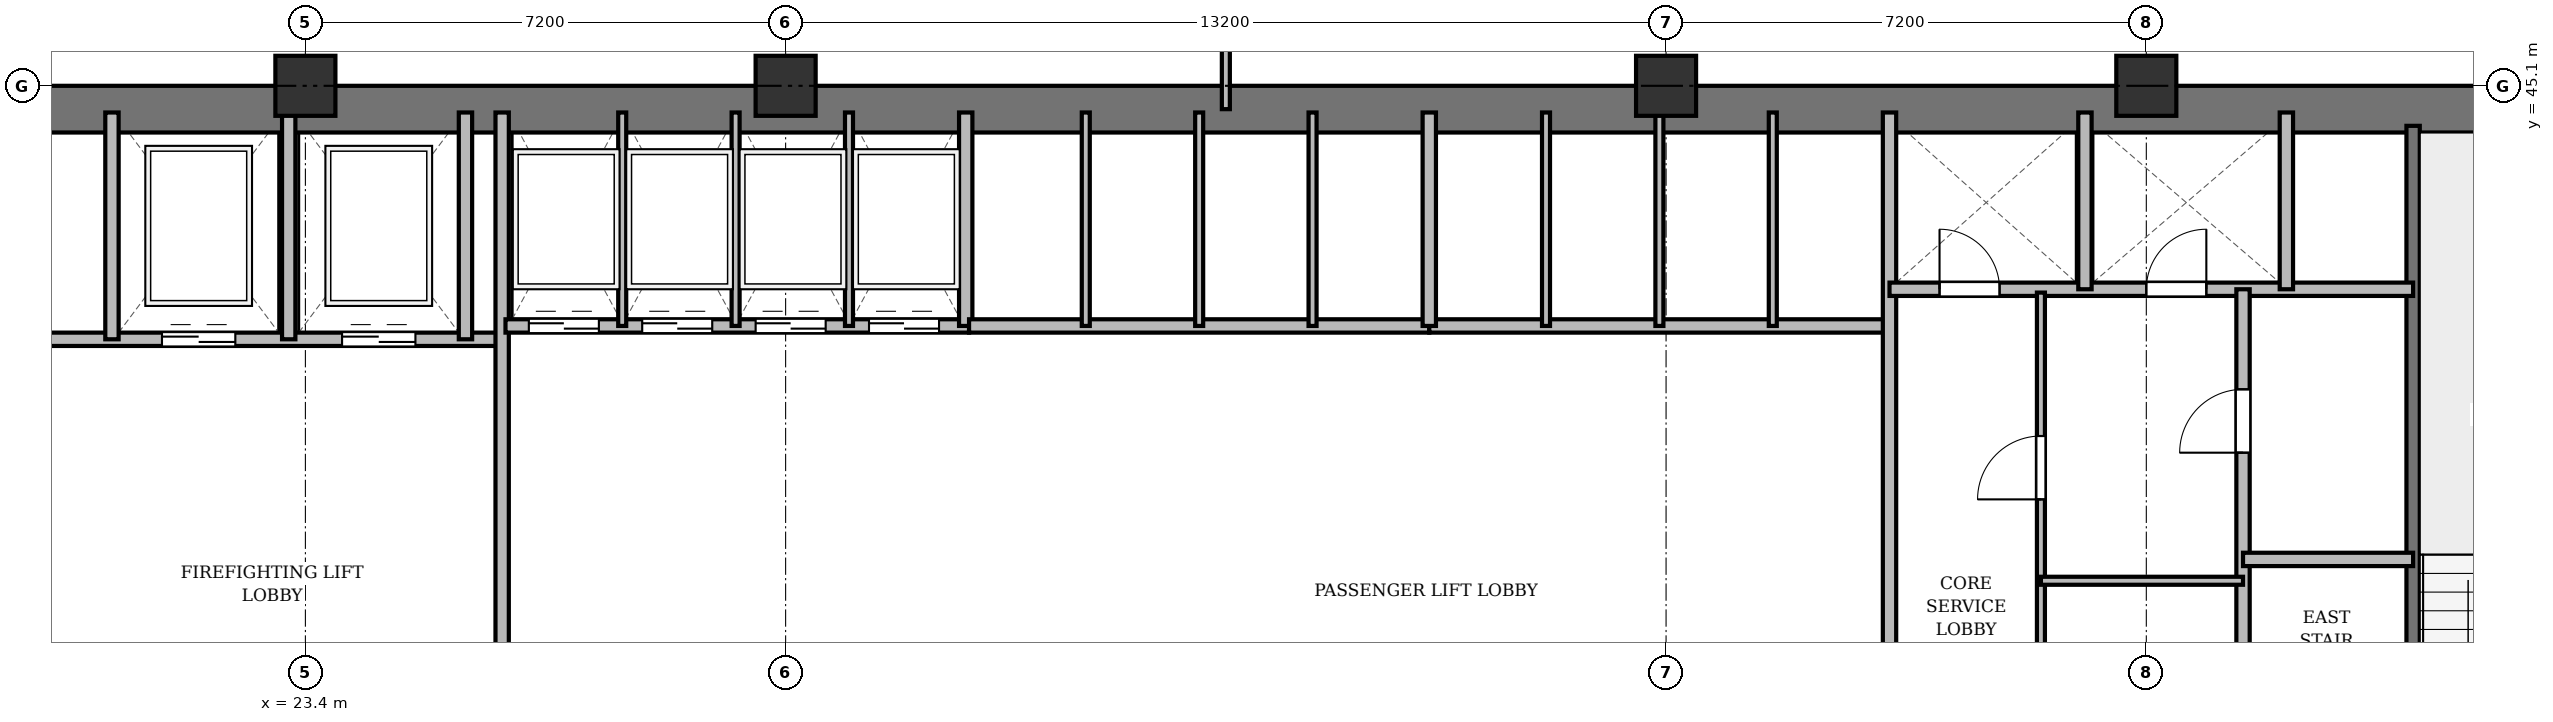
"""IFC4 building model, lengths in metres.
Left out: names, types, materials, properties, quantities, classifications, styles, units other than length and angle.
Written with IfcOpenShell. Run it as: python <this file> out.ifc"""

import sys

from ifc_helpers import new_model, si_unit, direction, frame, frame_2d, origin, origin_2d, place, context, subcontext, project, spatial, rectangle, extrude, source, transform, mapped, element, fill, save


model = new_model("IFC4")
c1 = context("Model", 3, precision=1e-05, world=origin(), true_north=direction((0.0, 1.0)))
c2 = subcontext(c1, "Body", "Model", "MODEL_VIEW")
j1 = project(units=[si_unit("LENGTHUNIT", "METRE"), si_unit("PLANEANGLEUNIT", "RADIAN")], contexts=[c1])
p1 = place(None, origin())
s1 = spatial("IfcSite", under=j1, at=p1, CompositionType="ELEMENT")
p2 = place(p1, origin())
s2 = spatial("IfcBuilding", under=s1, at=p2, CompositionType="ELEMENT")
p3 = place(p2, frame((0.0, 0.0, 37.9)))
s3 = spatial("IfcBuildingStorey", under=s2, at=p3, CompositionType="ELEMENT", Elevation=37.9)
m1 = source(origin(), c2, "Body", "SweptSolid", [
    extrude(rectangle(XDim=0.9, YDim=0.9, at=origin_2d()), origin(), (0.0, 0.0, 1.0), 3.6),
])
for number, where, z_axis, x_axis in (
    (1, (23.4, 45.1, 0.0), (0.0, 0.0, 1.0), (1.0, 0.0, 0.0)),
    (2, (30.6, 45.1, 0.0), (0.0, 0.0, 1.0), (1.0, 0.0, 0.0)),
    (3, (43.8, 45.1, 0.0), (0.0, 0.0, 1.0), (1.0, 0.0, 0.0)),
    (4, (51.0, 45.1, 0.0), (0.0, 0.0, 1.0), (1.0, 0.0, 0.0)),
):
    element("IfcColumn", number, at=place(p3, frame(where, z_axis=z_axis, x_axis=x_axis)), inside=s3, PredefinedType="COLUMN", context=c2, shape_type="MappedRepresentation", body=[
        mapped(m1, transform((0.0, 0.0, 0.0), x_axis=(1.0, 0.0, 0.0), y_axis=(0.0, 1.0, 0.0), z_axis=(0.0, 0.0, 1.0), scale=1.0)),
    ])
p4 = place(p3, frame((15.5, 44.75, 0.0), z_axis=(0.0, 0.0, 1.0), x_axis=(1.0, 0.0, 0.0)))
e5 = element("IfcWall", 5, at=p4, inside=s3, PredefinedType="SHEAR", context=c2, shape_type="SweptSolid", body=[
    extrude(rectangle(XDim=43.4, YDim=0.7, at=frame_2d((21.7, 0.0))), origin(), (0.0, 0.0, 1.0), 3.34),
])
p5 = place(p3, frame((55.0, 33.4, 0.0), z_axis=(0.0, 0.0, 1.0), x_axis=(0.0, 1.0, 0.0)))
e6 = element("IfcWall", 6, at=p5, inside=s3, PredefinedType="SHEAR", context=c2, shape_type="SweptSolid", body=[
    extrude(rectangle(XDim=11.1, YDim=0.2, at=frame_2d((5.55, 0.0))), origin(), (0.0, 0.0, 1.0), 3.34),
])
p6 = place(p5, frame((0.85, 0.0, 0.0)))
e7 = element("IfcOpeningElement", 7, at=p6, cuts=e6, PredefinedType="OPENING", context=c2, shape_type="SweptSolid", body=[
    extrude(rectangle(XDim=1.1, YDim=2.15, at=frame_2d((0.55, 1.075))), frame((0.0, 0.11, 0.0), z_axis=(0.0, -1.0, 0.0), x_axis=(1.0, 0.0, 0.0)), (0.0, 0.0, 1.0), 0.22),
])
p7 = place(p3, frame((19.55, 41.3, 0.0), z_axis=(0.0, 0.0, 1.0), x_axis=(1.0, 0.0, 0.0)))
e8 = element("IfcWall", 8, at=p7, inside=s3, PredefinedType="SOLIDWALL", context=c2, shape_type="SweptSolid", body=[
    extrude(rectangle(XDim=6.75, YDim=0.2, at=frame_2d((3.375, 0.0))), origin(), (0.0, 0.0, 1.0), 3.34),
])
p8 = place(p7, frame((1.7, 0.0, 0.0)))
e9 = element("IfcOpeningElement", 9, at=p8, cuts=e8, PredefinedType="OPENING", context=c2, shape_type="SweptSolid", body=[
    extrude(rectangle(XDim=1.1, YDim=2.15, at=frame_2d((0.55, 1.075))), frame((0.0, 0.11, 0.0), z_axis=(0.0, -1.0, 0.0), x_axis=(1.0, 0.0, 0.0)), (0.0, 0.0, 1.0), 0.22),
])
p9 = place(p7, frame((4.4, 0.0, 0.0)))
e10 = element("IfcOpeningElement", 10, at=p9, cuts=e8, PredefinedType="OPENING", context=c2, shape_type="SweptSolid", body=[
    extrude(rectangle(XDim=1.1, YDim=2.15, at=frame_2d((0.55, 1.075))), frame((0.0, 0.11, 0.0), z_axis=(0.0, -1.0, 0.0), x_axis=(1.0, 0.0, 0.0)), (0.0, 0.0, 1.0), 0.22),
])
for number, where, z_axis, x_axis in (
    (11, (20.5, 41.3, 0.0), (0.0, 0.0, 1.0), (0.0, 1.0, 0.0)),
    (12, (23.15, 41.3, 0.0), (0.0, 0.0, 1.0), (0.0, 1.0, 0.0)),
    (13, (25.8, 41.3, 0.0), (0.0, 0.0, 1.0), (0.0, 1.0, 0.0)),
):
    element("IfcWall", number, at=place(p3, frame(where, z_axis=z_axis, x_axis=x_axis)), inside=s3, PredefinedType="SOLIDWALL", context=c2, shape_type="SweptSolid", body=[
        extrude(rectangle(XDim=3.4, YDim=0.2, at=frame_2d((1.7, 0.0))), origin(), (0.0, 0.0, 1.0), 3.34),
    ])
p10 = place(p3, frame((26.35, 33.4, 0.0), z_axis=(0.0, 0.0, 1.0), x_axis=(0.0, 1.0, 0.0)))
e14 = element("IfcWall", 14, at=p10, inside=s3, PredefinedType="SOLIDWALL", context=c2, shape_type="SweptSolid", body=[
    extrude(rectangle(XDim=11.3, YDim=0.2, at=frame_2d((5.65, 0.0))), origin(), (0.0, 0.0, 1.0), 2.69),
])
p11 = place(p3, frame((26.4, 41.5, 0.0), z_axis=(0.0, 0.0, 1.0), x_axis=(1.0, 0.0, 0.0)))
e15 = element("IfcWall", 15, at=p11, inside=s3, PredefinedType="SOLIDWALL", context=c2, shape_type="SweptSolid", body=[
    extrude(rectangle(XDim=6.95, YDim=0.2, at=frame_2d((3.475, 0.0))), origin(), (0.0, 0.0, 1.0), 3.34),
])
p12 = place(p11, frame((0.35, 0.0, 0.0)))
e16 = element("IfcOpeningElement", 16, at=p12, cuts=e15, PredefinedType="OPENING", context=c2, shape_type="SweptSolid", body=[
    extrude(rectangle(XDim=1.05, YDim=2.15, at=frame_2d((0.525, 1.075))), frame((0.0, 0.11, 0.0), z_axis=(0.0, -1.0, 0.0), x_axis=(1.0, 0.0, 0.0)), (0.0, 0.0, 1.0), 0.22),
])
p13 = place(p11, frame((2.05, 0.0, 0.0)))
e17 = element("IfcOpeningElement", 17, at=p13, cuts=e15, PredefinedType="OPENING", context=c2, shape_type="SweptSolid", body=[
    extrude(rectangle(XDim=1.05, YDim=2.15, at=frame_2d((0.525, 1.075))), frame((0.0, 0.11, 0.0), z_axis=(0.0, -1.0, 0.0), x_axis=(1.0, 0.0, 0.0)), (0.0, 0.0, 1.0), 0.22),
])
p14 = place(p11, frame((3.75, 0.0, 0.0)))
e18 = element("IfcOpeningElement", 18, at=p14, cuts=e15, PredefinedType="OPENING", context=c2, shape_type="SweptSolid", body=[
    extrude(rectangle(XDim=1.05, YDim=2.15, at=frame_2d((0.525, 1.075))), frame((0.0, 0.11, 0.0), z_axis=(0.0, -1.0, 0.0), x_axis=(1.0, 0.0, 0.0)), (0.0, 0.0, 1.0), 0.22),
])
p15 = place(p11, frame((5.45, 0.0, 0.0)))
e19 = element("IfcOpeningElement", 19, at=p15, cuts=e15, PredefinedType="OPENING", context=c2, shape_type="SweptSolid", body=[
    extrude(rectangle(XDim=1.05, YDim=2.15, at=frame_2d((0.525, 1.075))), frame((0.0, 0.11, 0.0), z_axis=(0.0, -1.0, 0.0), x_axis=(1.0, 0.0, 0.0)), (0.0, 0.0, 1.0), 0.22),
])
p16 = place(p3, frame((33.3, 41.5, 0.0), z_axis=(0.0, 0.0, 1.0), x_axis=(0.0, 1.0, 0.0)))
e20 = element("IfcWall", 20, at=p16, inside=s3, PredefinedType="SOLIDWALL", context=c2, shape_type="SweptSolid", body=[
    extrude(rectangle(XDim=3.2, YDim=0.2, at=frame_2d((1.6, 0.0))), origin(), (0.0, 0.0, 1.0), 3.34),
])
for number, where, z_axis, x_axis in (
    (21, (28.15, 41.5, 0.0), (0.0, 0.0, 1.0), (0.0, 1.0, 0.0)),
    (22, (29.85, 41.5, 0.0), (0.0, 0.0, 1.0), (0.0, 1.0, 0.0)),
    (23, (31.55, 41.5, 0.0), (0.0, 0.0, 1.0), (0.0, 1.0, 0.0)),
):
    element("IfcWall", number, at=place(p3, frame(where, z_axis=z_axis, x_axis=x_axis)), inside=s3, PredefinedType="PARTITIONING", context=c2, shape_type="SweptSolid", body=[
        extrude(rectangle(XDim=3.2, YDim=0.12, at=frame_2d((1.6, 0.0))), origin(), (0.0, 0.0, 1.0), 3.34),
    ])
p17 = place(p3, frame((33.35, 41.5, 0.0), z_axis=(0.0, 0.0, 1.0), x_axis=(1.0, 0.0, 0.0)))
e24 = element("IfcWall", 24, at=p17, inside=s3, PredefinedType="SOLIDWALL", context=c2, shape_type="SweptSolid", body=[
    extrude(rectangle(XDim=6.9, YDim=0.2, at=frame_2d((3.45, 0.0))), origin(), (0.0, 0.0, 1.0), 3.34),
])
for number, where, z_axis, x_axis in (
    (25, (35.1, 41.5, 0.0), (0.0, 0.0, 1.0), (0.0, 1.0, 0.0)),
    (26, (36.8, 41.5, 0.0), (0.0, 0.0, 1.0), (0.0, 1.0, 0.0)),
    (27, (38.5, 41.5, 0.0), (0.0, 0.0, 1.0), (0.0, 1.0, 0.0)),
):
    element("IfcWall", number, at=place(p3, frame(where, z_axis=z_axis, x_axis=x_axis)), inside=s3, PredefinedType="PARTITIONING", context=c2, shape_type="SweptSolid", body=[
        extrude(rectangle(XDim=3.2, YDim=0.12, at=frame_2d((1.6, 0.0))), origin(), (0.0, 0.0, 1.0), 3.34),
    ])
p18 = place(p3, frame((40.25, 41.5, 0.0), z_axis=(0.0, 0.0, 1.0), x_axis=(1.0, 0.0, 0.0)))
e28 = element("IfcWall", 28, at=p18, inside=s3, PredefinedType="SOLIDWALL", context=c2, shape_type="SweptSolid", body=[
    extrude(rectangle(XDim=6.9, YDim=0.2, at=frame_2d((3.45, 0.0))), origin(), (0.0, 0.0, 1.0), 2.752),
])
p19 = place(p3, frame((40.25, 41.5, 0.0), z_axis=(0.0, 0.0, 1.0), x_axis=(0.0, 1.0, 0.0)))
e29 = element("IfcWall", 29, at=p19, inside=s3, PredefinedType="SOLIDWALL", context=c2, shape_type="SweptSolid", body=[
    extrude(rectangle(XDim=3.2, YDim=0.2, at=frame_2d((1.6, 0.0))), origin(), (0.0, 0.0, 1.0), 3.34),
])
p20 = place(p3, frame((42.0, 41.5, 0.0), z_axis=(0.0, 0.0, 1.0), x_axis=(0.0, 1.0, 0.0)))
e30 = element("IfcWall", 30, at=p20, inside=s3, PredefinedType="PARTITIONING", context=c2, shape_type="SweptSolid", body=[
    extrude(rectangle(XDim=3.2, YDim=0.12, at=frame_2d((1.6, 0.0))), origin(), (0.0, 0.0, 1.0), 3.34),
])
p21 = place(p3, frame((43.7, 41.5, 0.0), z_axis=(0.0, 0.0, 1.0), x_axis=(0.0, 1.0, 0.0)))
e31 = element("IfcWall", 31, at=p21, inside=s3, PredefinedType="PARTITIONING", context=c2, shape_type="SweptSolid", body=[
    extrude(rectangle(XDim=3.2, YDim=0.12, at=frame_2d((1.6, 0.0))), origin(), (0.0, 0.0, 1.0), 2.752),
])
p22 = place(p3, frame((45.4, 41.5, 0.0), z_axis=(0.0, 0.0, 1.0), x_axis=(0.0, 1.0, 0.0)))
e32 = element("IfcWall", 32, at=p22, inside=s3, PredefinedType="PARTITIONING", context=c2, shape_type="SweptSolid", body=[
    extrude(rectangle(XDim=3.2, YDim=0.12, at=frame_2d((1.6, 0.0))), origin(), (0.0, 0.0, 1.0), 3.34),
])
p23 = place(p3, frame((47.15, 33.4, 0.0), z_axis=(0.0, 0.0, 1.0), x_axis=(0.0, 1.0, 0.0)))
e33 = element("IfcWall", 33, at=p23, inside=s3, PredefinedType="SOLIDWALL", context=c2, shape_type="SweptSolid", body=[
    extrude(rectangle(XDim=11.3, YDim=0.2, at=frame_2d((5.65, 0.0))), origin(), (0.0, 0.0, 1.0), 2.69),
])
p24 = place(p3, frame((47.15, 42.05, 0.0), z_axis=(0.0, 0.0, 1.0), x_axis=(1.0, 0.0, 0.0)))
e34 = element("IfcWall", 34, at=p24, inside=s3, PredefinedType="SOLIDWALL", context=c2, shape_type="SweptSolid", body=[
    extrude(rectangle(XDim=7.85, YDim=0.2, at=frame_2d((3.925, 0.0))), origin(), (0.0, 0.0, 1.0), 2.752),
])
p25 = place(p24, frame((0.75, 0.0, 0.0)))
e35 = element("IfcOpeningElement", 35, at=p25, cuts=e34, PredefinedType="OPENING", context=c2, shape_type="SweptSolid", body=[
    extrude(rectangle(XDim=0.9, YDim=2.1, at=frame_2d((0.45, 1.05))), frame((0.0, 0.11, 0.0), z_axis=(0.0, -1.0, 0.0), x_axis=(1.0, 0.0, 0.0)), (0.0, 0.0, 1.0), 0.22),
])
p26 = place(p24, frame((3.85, 0.0, 0.0)))
e36 = element("IfcOpeningElement", 36, at=p26, cuts=e34, PredefinedType="OPENING", context=c2, shape_type="SweptSolid", body=[
    extrude(rectangle(XDim=0.9, YDim=2.1, at=frame_2d((0.45, 1.05))), frame((0.0, 0.11, 0.0), z_axis=(0.0, -1.0, 0.0), x_axis=(1.0, 0.0, 0.0)), (0.0, 0.0, 1.0), 0.22),
])
for number, where, z_axis, x_axis in (
    (37, (50.08, 42.05, 0.0), (0.0, 0.0, 1.0), (0.0, 1.0, 0.0)),
    (38, (53.1, 42.05, 0.0), (0.0, 0.0, 1.0), (0.0, 1.0, 0.0)),
):
    element("IfcWall", number, at=place(p3, frame(where, z_axis=z_axis, x_axis=x_axis)), inside=s3, PredefinedType="SOLIDWALL", context=c2, shape_type="SweptSolid", body=[
        extrude(rectangle(XDim=2.65, YDim=0.2, at=frame_2d((1.325, 0.0))), origin(), (0.0, 0.0, 1.0), 3.34),
    ])
p27 = place(p3, frame((52.45, 33.4, 0.0), z_axis=(0.0, 0.0, 1.0), x_axis=(0.0, 1.0, 0.0)))
e39 = element("IfcWall", 39, at=p27, inside=s3, PredefinedType="PARTITIONING", context=c2, shape_type="SweptSolid", body=[
    extrude(rectangle(XDim=8.65, YDim=0.2, at=frame_2d((4.325, 0.0))), origin(), (0.0, 0.0, 1.0), 2.69),
])
p28 = place(p27, frame((6.2, 0.0, 0.0)))
e40 = element("IfcOpeningElement", 40, at=p28, cuts=e39, PredefinedType="OPENING", context=c2, shape_type="SweptSolid", body=[
    extrude(rectangle(XDim=0.95, YDim=2.15, at=frame_2d((0.475, 1.075))), frame((0.0, 0.11, 0.0), z_axis=(0.0, -1.0, 0.0), x_axis=(1.0, 0.0, 0.0)), (0.0, 0.0, 1.0), 0.22),
])
p29 = place(p3, frame((52.45, 38.0, 0.0), z_axis=(0.0, 0.0, 1.0), x_axis=(1.0, 0.0, 0.0)))
e41 = element("IfcWall", 41, at=p29, inside=s3, PredefinedType="PARTITIONING", context=c2, shape_type="SweptSolid", body=[
    extrude(rectangle(XDim=2.55, YDim=0.2, at=frame_2d((1.275, 0.0))), origin(), (0.0, 0.0, 1.0), 3.34),
])
p30 = place(p3, frame((49.42, 33.4, 0.0), z_axis=(0.0, 0.0, 1.0), x_axis=(0.0, 1.0, 0.0)))
e42 = element("IfcWall", 42, at=p30, inside=s3, PredefinedType="PARTITIONING", context=c2, shape_type="SweptSolid", body=[
    extrude(rectangle(XDim=8.6, YDim=0.12, at=frame_2d((4.3, 0.0))), origin(), (0.0, 0.0, 1.0), 2.69),
])
p31 = place(p30, frame((1.3, 0.0, 0.0)))
e43 = element("IfcOpeningElement", 43, at=p31, cuts=e42, PredefinedType="OPENING", context=c2, shape_type="SweptSolid", body=[
    extrude(rectangle(XDim=0.95, YDim=2.15, at=frame_2d((0.475, 1.075))), frame((0.0, 0.07, 0.0), z_axis=(0.0, -1.0, 0.0), x_axis=(1.0, 0.0, 0.0)), (0.0, 0.0, 1.0), 0.14),
])
p32 = place(p30, frame((5.5, 0.0, 0.0)))
e44 = element("IfcOpeningElement", 44, at=p32, cuts=e42, PredefinedType="OPENING", context=c2, shape_type="SweptSolid", body=[
    extrude(rectangle(XDim=0.95, YDim=2.15, at=frame_2d((0.475, 1.075))), frame((0.0, 0.07, 0.0), z_axis=(0.0, -1.0, 0.0), x_axis=(1.0, 0.0, 0.0)), (0.0, 0.0, 1.0), 0.14),
])
p33 = place(p3, frame((49.42, 37.68, 0.0), z_axis=(0.0, 0.0, 1.0), x_axis=(1.0, 0.0, 0.0)))
e45 = element("IfcWall", 45, at=p33, inside=s3, PredefinedType="PARTITIONING", context=c2, shape_type="SweptSolid", body=[
    extrude(rectangle(XDim=3.03, YDim=0.12, at=frame_2d((1.515, 0.0))), origin(), (0.0, 0.0, 1.0), 2.752),
])
p34 = place(p3, frame((37.2, 44.75, 0.0), z_axis=(0.0, 0.0, 1.0), x_axis=(0.0, 1.0, 0.0)))
e46 = element("IfcWall", 46, at=p34, inside=s3, PredefinedType="PARTITIONING", context=c2, shape_type="SweptSolid", body=[
    extrude(rectangle(XDim=3.61, YDim=0.12, at=frame_2d((1.805, 0.0))), origin(), (0.0, 0.0, 1.0), 2.69),
])
p35 = place(p34, frame((1.1, 0.0, 0.0)))
e47 = element("IfcOpeningElement", 47, at=p35, cuts=e46, PredefinedType="OPENING", context=c2, shape_type="SweptSolid", body=[
    extrude(rectangle(XDim=0.95, YDim=2.15, at=frame_2d((0.475, 1.075))), frame((0.0, 0.07, 0.0), z_axis=(0.0, -1.0, 0.0), x_axis=(1.0, 0.0, 0.0)), (0.0, 0.0, 1.0), 0.14),
])
m2 = source(origin(), c2, "Body", "SweptSolid", [
    extrude(rectangle(XDim=1.1, YDim=2.15, at=frame_2d((0.55, 1.075))), frame((0.0, 0.025, 0.0), z_axis=(0.0, -1.0, 0.0), x_axis=(1.0, 0.0, 0.0)), (0.0, 0.0, 1.0), 0.05),
])
p36 = place(p8, origin())
e48 = element("IfcDoor", 48, at=p36, inside=s3, OperationType="DOUBLE_DOOR_SLIDING", PredefinedType="DOOR", context=c2, shape_type="MappedRepresentation", body=[
    mapped(m2, transform((0.0, 0.0, 0.0), x_axis=(1.0, 0.0, 0.0), y_axis=(0.0, 1.0, 0.0), z_axis=(0.0, 0.0, 1.0), scale=1.0)),
])
fill(e9, e48)
p37 = place(p9, origin())
e49 = element("IfcDoor", 49, at=p37, inside=s3, OperationType="DOUBLE_DOOR_SLIDING", PredefinedType="DOOR", context=c2, shape_type="MappedRepresentation", body=[
    mapped(m2, transform((0.0, 0.0, 0.0), x_axis=(1.0, 0.0, 0.0), y_axis=(0.0, 1.0, 0.0), z_axis=(0.0, 0.0, 1.0), scale=1.0)),
])
fill(e10, e49)
m3 = source(origin(), c2, "Body", "SweptSolid", [
    extrude(rectangle(XDim=1.05, YDim=2.15, at=frame_2d((0.525, 1.075))), frame((0.0, 0.025, 0.0), z_axis=(0.0, -1.0, 0.0), x_axis=(1.0, 0.0, 0.0)), (0.0, 0.0, 1.0), 0.05),
])
p38 = place(p12, origin())
e50 = element("IfcDoor", 50, at=p38, inside=s3, OperationType="DOUBLE_DOOR_SLIDING", PredefinedType="DOOR", context=c2, shape_type="MappedRepresentation", body=[
    mapped(m3, transform((0.0, 0.0, 0.0), x_axis=(1.0, 0.0, 0.0), y_axis=(0.0, 1.0, 0.0), z_axis=(0.0, 0.0, 1.0), scale=1.0)),
])
fill(e16, e50)
p39 = place(p13, origin())
e51 = element("IfcDoor", 51, at=p39, inside=s3, OperationType="DOUBLE_DOOR_SLIDING", PredefinedType="DOOR", context=c2, shape_type="MappedRepresentation", body=[
    mapped(m3, transform((0.0, 0.0, 0.0), x_axis=(1.0, 0.0, 0.0), y_axis=(0.0, 1.0, 0.0), z_axis=(0.0, 0.0, 1.0), scale=1.0)),
])
fill(e17, e51)
p40 = place(p14, origin())
e52 = element("IfcDoor", 52, at=p40, inside=s3, OperationType="DOUBLE_DOOR_SLIDING", PredefinedType="DOOR", context=c2, shape_type="MappedRepresentation", body=[
    mapped(m3, transform((0.0, 0.0, 0.0), x_axis=(1.0, 0.0, 0.0), y_axis=(0.0, 1.0, 0.0), z_axis=(0.0, 0.0, 1.0), scale=1.0)),
])
fill(e18, e52)
p41 = place(p15, origin())
e53 = element("IfcDoor", 53, at=p41, inside=s3, OperationType="DOUBLE_DOOR_SLIDING", PredefinedType="DOOR", context=c2, shape_type="MappedRepresentation", body=[
    mapped(m3, transform((0.0, 0.0, 0.0), x_axis=(1.0, 0.0, 0.0), y_axis=(0.0, 1.0, 0.0), z_axis=(0.0, 0.0, 1.0), scale=1.0)),
])
fill(e19, e53)
m4 = source(origin(), c2, "Body", "SweptSolid", [
    extrude(rectangle(XDim=0.9, YDim=2.1, at=frame_2d((0.45, 1.05))), frame((0.0, 0.025, 0.0), z_axis=(0.0, -1.0, 0.0), x_axis=(1.0, 0.0, 0.0)), (0.0, 0.0, 1.0), 0.05),
])
p42 = place(p25, origin())
e54 = element("IfcDoor", 54, at=p42, inside=s3, OperationType="SINGLE_SWING_LEFT", PredefinedType="DOOR", context=c2, shape_type="MappedRepresentation", body=[
    mapped(m4, transform((0.0, 0.0, 0.0), x_axis=(1.0, 0.0, 0.0), y_axis=(0.0, 1.0, 0.0), z_axis=(0.0, 0.0, 1.0), scale=1.0)),
])
fill(e35, e54)
p43 = place(p26, origin())
e55 = element("IfcDoor", 55, at=p43, inside=s3, OperationType="SINGLE_SWING_RIGHT", PredefinedType="DOOR", context=c2, shape_type="MappedRepresentation", body=[
    mapped(m4, transform((0.0, 0.0, 0.0), x_axis=(1.0, 0.0, 0.0), y_axis=(0.0, 1.0, 0.0), z_axis=(0.0, 0.0, 1.0), scale=1.0)),
])
fill(e36, e55)
m5 = source(origin(), c2, "Body", "SweptSolid", [
    extrude(rectangle(XDim=0.95, YDim=2.15, at=frame_2d((0.475, 1.075))), frame((0.0, 0.025, 0.0), z_axis=(0.0, -1.0, 0.0), x_axis=(1.0, 0.0, 0.0)), (0.0, 0.0, 1.0), 0.05),
])
p44 = place(p28, origin())
e56 = element("IfcDoor", 56, at=p44, inside=s3, OperationType="SINGLE_SWING_LEFT", PredefinedType="DOOR", context=c2, shape_type="MappedRepresentation", body=[
    mapped(m5, transform((0.0, 0.0, 0.0), x_axis=(1.0, 0.0, 0.0), y_axis=(0.0, 1.0, 0.0), z_axis=(0.0, 0.0, 1.0), scale=1.0)),
])
fill(e40, e56)
p45 = place(p32, origin())
e57 = element("IfcDoor", 57, at=p45, inside=s3, OperationType="SINGLE_SWING_LEFT", PredefinedType="DOOR", context=c2, shape_type="MappedRepresentation", body=[
    mapped(m5, transform((0.0, 0.0, 0.0), x_axis=(1.0, 0.0, 0.0), y_axis=(0.0, 1.0, 0.0), z_axis=(0.0, 0.0, 1.0), scale=1.0)),
])
fill(e44, e57)
save(model, sys.argv[1])
